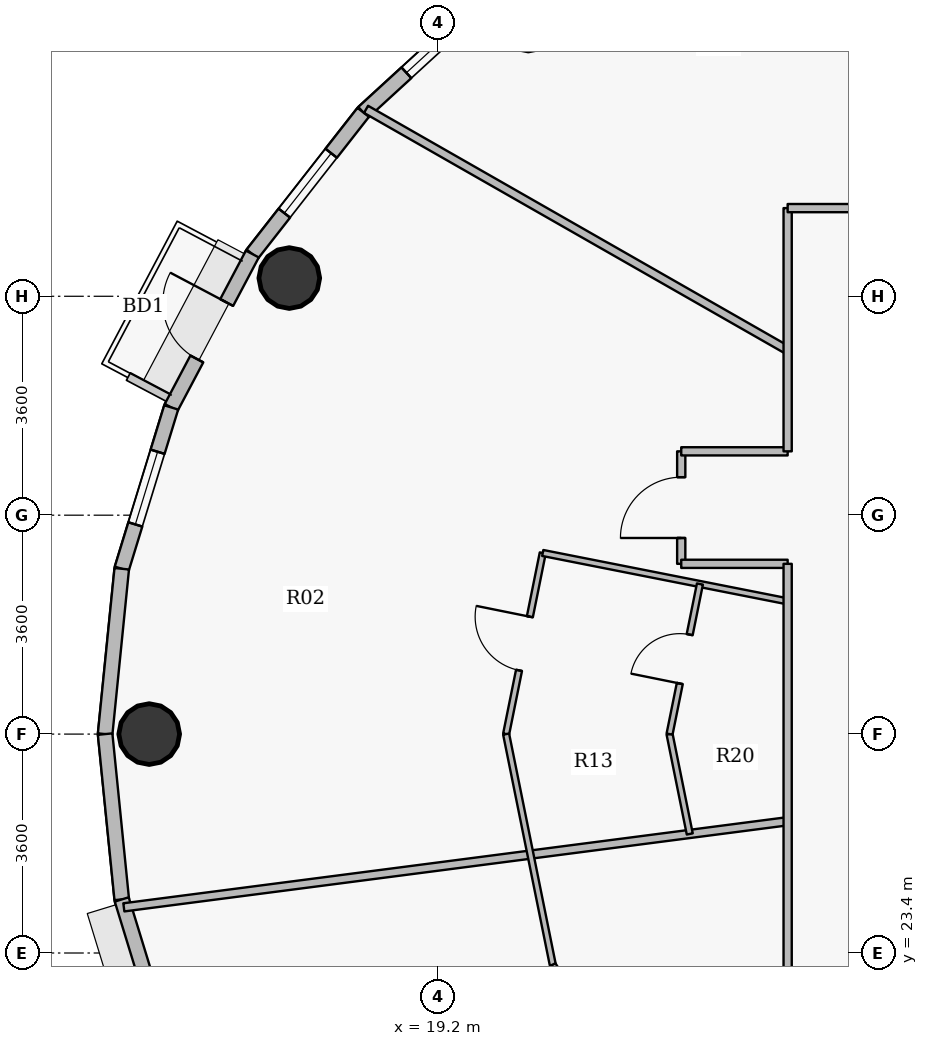
"""IFC4 building model, lengths in metres.
Left out: names, types, materials, properties, quantities, classifications, styles, units other than length and angle.
Written with IfcOpenShell. Run it as: python <this file> out.ifc"""

import sys

from ifc_helpers import new_model, si_unit, direction, frame, frame_2d, origin, origin_2d, place, context, subcontext, project, spatial, rectangle, hollow_circle, extrude, source, transform, mapped, element, fill, save


model = new_model("IFC4")
c1 = context("Model", 3, precision=1e-05, world=origin(), true_north=direction((0.0, 1.0)))
c2 = subcontext(c1, "Body", "Model", "MODEL_VIEW")
j1 = project(units=[si_unit("LENGTHUNIT", "METRE"), si_unit("PLANEANGLEUNIT", "RADIAN")], contexts=[c1])
p1 = place(None, origin())
s1 = spatial("IfcSite", under=j1, at=p1, CompositionType="ELEMENT")
p2 = place(p1, origin())
s2 = spatial("IfcBuilding", under=s1, at=p2, CompositionType="ELEMENT")
p3 = place(p2, frame((0.0, 0.0, 303.0)))
s3 = spatial("IfcBuildingStorey", under=s2, at=p3, CompositionType="ELEMENT", Elevation=303.0)
for number, where, z_axis, x_axis in (
    (1, (16.754, 34.5, 0.0), (0.0, 0.0, 1.0), (1.0, 0.0, 0.0)),
    (2, (14.45, 27.0, 0.0), (0.0, 0.0, 1.0), (1.0, 0.0, 0.0)),
):
    element("IfcColumn", number, at=place(p3, frame(where, z_axis=z_axis, x_axis=x_axis)), inside=s3, PredefinedType="COLUMN", context=c2, shape_type="SweptSolid", body=[
        extrude(hollow_circle(Radius=0.5, WallThickness=0.032, at=origin_2d()), origin(), (0.0, 0.0, 1.0), 3.75),
    ])
p4 = place(p3, frame((17.97, 37.225, 0.0), z_axis=(0.0, 0.0, 1.0), x_axis=(0.737068506972, 0.675818034703, 0.0)))
e3 = element("IfcWall", 3, at=p4, inside=s3, PredefinedType="SOLIDWALL", context=c2, shape_type="SweptSolid", body=[
    extrude(rectangle(XDim=3.077, YDim=0.24, at=frame_2d((1.539, 0.0))), origin(), (0.0, 0.0, 1.0), 3.5),
])
p5 = place(p4, frame((0.963, 0.0, 0.9)))
e4 = element("IfcOpeningElement", 4, at=p5, cuts=e3, PredefinedType="OPENING", context=c2, shape_type="SweptSolid", body=[
    extrude(rectangle(XDim=1.25, YDim=1.65, at=origin_2d()), frame((0.625, 0.13, 0.825), z_axis=(0.0, -1.0, 0.0), x_axis=(1.0, 0.0, 0.0)), (0.0, 0.0, 1.0), 0.26),
])
p6 = place(p3, frame((16.146, 34.895, 0.0), z_axis=(0.0, 0.0, 1.0), x_axis=(0.616337186556, 0.787482363275, 0.0)))
e5 = element("IfcWall", 5, at=p6, inside=s3, PredefinedType="SOLIDWALL", context=c2, shape_type="SweptSolid", body=[
    extrude(rectangle(XDim=2.958, YDim=0.24, at=frame_2d((1.479, 0.0))), origin(), (0.0, 0.0, 1.0), 3.5),
])
p7 = place(p6, frame((0.854, 0.0, 0.9)))
e6 = element("IfcOpeningElement", 6, at=p7, cuts=e5, PredefinedType="OPENING", context=c2, shape_type="SweptSolid", body=[
    extrude(rectangle(XDim=1.25, YDim=1.65, at=origin_2d()), frame((0.625, 0.13, 0.825), z_axis=(0.0, -1.0, 0.0), x_axis=(1.0, 0.0, 0.0)), (0.0, 0.0, 1.0), 0.26),
])
p8 = place(p3, frame((14.812, 32.372, 0.0), z_axis=(0.0, 0.0, 1.0), x_axis=(0.467628269026, 0.883925224218, 0.0)))
e7 = element("IfcWall", 7, at=p8, inside=s3, PredefinedType="SOLIDWALL", context=c2, shape_type="SweptSolid", body=[
    extrude(rectangle(XDim=2.854, YDim=0.24, at=frame_2d((1.427, 0.0))), origin(), (0.0, 0.0, 1.0), 3.5),
])
p9 = place(p8, frame((0.902, 0.0, 0.0)))
e8 = element("IfcOpeningElement", 8, at=p9, cuts=e7, PredefinedType="OPENING", context=c2, shape_type="SweptSolid", body=[
    extrude(rectangle(XDim=1.05, YDim=2.15, at=origin_2d()), frame((0.525, 0.13, 1.075), z_axis=(0.0, -1.0, 0.0), x_axis=(1.0, 0.0, 0.0)), (0.0, 0.0, 1.0), 0.26),
])
p10 = place(p3, frame((13.998, 29.719, 0.0), z_axis=(0.0, 0.0, 1.0), x_axis=(0.2931213403, 0.956075248012, 0.0)))
e9 = element("IfcWall", 9, at=p10, inside=s3, PredefinedType="SOLIDWALL", context=c2, shape_type="SweptSolid", body=[
    extrude(rectangle(XDim=2.775, YDim=0.24, at=frame_2d((1.388, 0.0))), origin(), (0.0, 0.0, 1.0), 3.5),
])
p11 = place(p10, frame((0.763, 0.0, 0.9)))
e10 = element("IfcOpeningElement", 10, at=p11, cuts=e9, PredefinedType="OPENING", context=c2, shape_type="SweptSolid", body=[
    extrude(rectangle(XDim=1.25, YDim=1.65, at=origin_2d()), frame((0.625, 0.13, 0.825), z_axis=(0.0, -1.0, 0.0), x_axis=(1.0, 0.0, 0.0)), (0.0, 0.0, 1.0), 0.26),
])
for number, where, z_axis, x_axis in (
    (11, (13.725, 27.0, 0.0), (0.0, 0.0, 1.0), (0.1, 0.995, 0.0)),
    (12, (13.998, 24.281, 0.0), (0.0, 0.0, 1.0), (-0.1, 0.995, 0.0)),
):
    element("IfcWall", number, at=place(p3, frame(where, z_axis=z_axis, x_axis=x_axis)), inside=s3, PredefinedType="SOLIDWALL", context=c2, shape_type="SweptSolid", body=[
        extrude(rectangle(XDim=2.733, YDim=0.24, at=frame_2d((1.366, 0.0))), origin(), (0.0, 0.0, 1.0), 3.5),
    ])
p12 = place(p3, frame((14.812, 21.628, 0.0), z_axis=(0.0, 0.0, 1.0), x_axis=(-0.2931213403, 0.956075248012, 0.0)))
e13 = element("IfcWall", 13, at=p12, inside=s3, PredefinedType="SOLIDWALL", context=c2, shape_type="SweptSolid", body=[
    extrude(rectangle(XDim=2.775, YDim=0.24, at=frame_2d((1.388, 0.0))), origin(), (0.0, 0.0, 1.0), 3.5),
])
p13 = place(p3, frame((14.033, 24.151, 0.0), z_axis=(0.0, 0.0, 1.0), x_axis=(0.99169266035, 0.128629963101, 0.0)))
e14 = element("IfcWall", 14, at=p13, inside=s3, PredefinedType="PARTITIONING", context=c2, shape_type="SweptSolid", body=[
    extrude(rectangle(XDim=11.009, YDim=0.135, at=frame_2d((5.504, 0.0))), origin(), (0.0, 0.0, 1.0), 2.985),
])
p14 = place(p3, frame((18.016, 37.274, 0.0), z_axis=(0.0, 0.0, 1.0), x_axis=(0.868277005727, -0.496079672357, 0.0)))
e15 = element("IfcWall", 15, at=p14, inside=s3, PredefinedType="PARTITIONING", context=c2, shape_type="SweptSolid", body=[
    extrude(rectangle(XDim=7.985, YDim=0.135, at=frame_2d((3.993, 0.0))), origin(), (0.0, 0.0, 1.0), 2.985),
])
p15 = place(p3, frame((20.32, 27.0, 0.0), z_axis=(0.0, 0.0, 1.0), x_axis=(0.198201469781, 0.980161301713, 0.0)))
e16 = element("IfcWall", 16, at=p15, inside=s3, PredefinedType="PARTITIONING", context=c2, shape_type="SweptSolid", body=[
    extrude(rectangle(XDim=3.039, YDim=0.1, at=frame_2d((1.52, 0.0))), origin(), (0.0, 0.0, 1.0), 3.035),
])
p16 = place(p15, frame((1.069, 0.0, 0.0)))
e17 = element("IfcOpeningElement", 17, at=p16, cuts=e16, PredefinedType="OPENING", context=c2, shape_type="SweptSolid", body=[
    extrude(rectangle(XDim=0.9, YDim=2.1, at=origin_2d()), frame((0.45, 0.06, 1.05), z_axis=(0.0, -1.0, 0.0), x_axis=(1.0, 0.0, 0.0)), (0.0, 0.0, 1.0), 0.12),
])
p17 = place(p3, frame((20.32, 27.0, 0.0), z_axis=(0.0, 0.0, 1.0), x_axis=(0.198226068862, -0.980156327135, 0.0)))
e18 = element("IfcWall", 18, at=p17, inside=s3, PredefinedType="PARTITIONING", context=c2, shape_type="SweptSolid", body=[
    extrude(rectangle(XDim=3.871, YDim=0.1, at=frame_2d((1.936, 0.0))), origin(), (0.0, 0.0, 1.0), 3.035),
])
p18 = place(p3, frame((20.922, 29.979, 0.0), z_axis=(0.0, 0.0, 1.0), x_axis=(0.981042206934, -0.19379419035, 0.0)))
e19 = element("IfcWall", 19, at=p18, inside=s3, PredefinedType="PARTITIONING", context=c2, shape_type="SweptSolid", body=[
    extrude(rectangle(XDim=4.106, YDim=0.1, at=frame_2d((2.053, 0.0))), origin(), (0.0, 0.0, 1.0), 3.5),
])
p19 = place(p3, frame((21.087, 23.206, 0.0), z_axis=(0.0, 0.0, 1.0), x_axis=(0.545435886628, -0.838152547916, 0.0)))
e20 = element("IfcWall", 20, at=p19, inside=s3, PredefinedType="PARTITIONING", context=c2, shape_type="SweptSolid", body=[
    extrude(rectangle(XDim=4.083, YDim=0.1, at=frame_2d((2.042, 0.0))), origin(), (0.0, 0.0, 1.0), 3.035),
])
p20 = place(p3, frame((23.008, 27.0, 0.0), z_axis=(0.0, 0.0, 1.0), x_axis=(0.198189512146, -0.980163719628, 0.0)))
e21 = element("IfcWall", 21, at=p20, inside=s3, PredefinedType="PARTITIONING", context=c2, shape_type="SweptSolid", body=[
    extrude(rectangle(XDim=1.675, YDim=0.1, at=frame_2d((0.838, 0.0))), origin(), (0.0, 0.0, 1.0), 3.035),
])
p21 = place(p3, frame((23.008, 27.0, 0.0), z_axis=(0.0, 0.0, 1.0), x_axis=(0.19818541272, 0.980164548525, 0.0)))
e22 = element("IfcWall", 22, at=p21, inside=s3, PredefinedType="PARTITIONING", context=c2, shape_type="SweptSolid", body=[
    extrude(rectangle(XDim=2.518, YDim=0.1, at=frame_2d((1.259, 0.0))), origin(), (0.0, 0.0, 1.0), 3.035),
])
p22 = place(p21, frame((0.849, 0.0, 0.0)))
e23 = element("IfcOpeningElement", 23, at=p22, cuts=e22, PredefinedType="OPENING", context=c2, shape_type="SweptSolid", body=[
    extrude(rectangle(XDim=0.82, YDim=2.1, at=origin_2d()), frame((0.41, 0.06, 1.05), z_axis=(0.0, -1.0, 0.0), x_axis=(1.0, 0.0, 0.0)), (0.0, 0.0, 1.0), 0.12),
])
p23 = place(p3, frame((23.2, 29.8, 0.0), z_axis=(0.0, 0.0, 1.0), x_axis=(0.0, 1.0, 0.0)))
e24 = element("IfcWall", 24, at=p23, inside=s3, PredefinedType="PARTITIONING", context=c2, shape_type="SweptSolid", body=[
    extrude(rectangle(XDim=1.85, YDim=0.135, at=frame_2d((0.925, 0.0))), origin(), (0.0, 0.0, 1.0), 3.5),
])
p24 = place(p23, frame((0.425, 0.0, 0.0)))
e25 = element("IfcOpeningElement", 25, at=p24, cuts=e24, PredefinedType="OPENING", context=c2, shape_type="SweptSolid", body=[
    extrude(rectangle(XDim=1.0, YDim=2.15, at=origin_2d()), frame((0.5, 0.078, 1.075), z_axis=(0.0, -1.0, 0.0), x_axis=(1.0, 0.0, 0.0)), (0.0, 0.0, 1.0), 0.155),
])
p25 = place(p3, frame((23.2, 29.8, 0.0), z_axis=(0.0, 0.0, 1.0), x_axis=(1.0, 0.0, 0.0)))
e26 = element("IfcWall", 26, at=p25, inside=s3, PredefinedType="PARTITIONING", context=c2, shape_type="SweptSolid", body=[
    extrude(rectangle(XDim=1.75, YDim=0.135, at=frame_2d((0.875, 0.0))), origin(), (0.0, 0.0, 1.0), 3.5),
])
p26 = place(p3, frame((23.2, 31.65, 0.0), z_axis=(0.0, 0.0, 1.0), x_axis=(1.0, 0.0, 0.0)))
e27 = element("IfcWall", 27, at=p26, inside=s3, PredefinedType="PARTITIONING", context=c2, shape_type="SweptSolid", body=[
    extrude(rectangle(XDim=1.75, YDim=0.135, at=frame_2d((0.875, 0.0))), origin(), (0.0, 0.0, 1.0), 3.035),
])
p27 = place(p3, frame((24.95, 18.35, 0.0), z_axis=(0.0, 0.0, 1.0), x_axis=(0.0, 1.0, 0.0)))
e28 = element("IfcWall", 28, at=p27, inside=s3, PredefinedType="PARTITIONING", context=c2, shape_type="SweptSolid", body=[
    extrude(rectangle(XDim=11.45, YDim=0.135, at=frame_2d((5.725, 0.0))), origin(), (0.0, 0.0, 1.0), 3.035),
])
p28 = place(p27, frame((3.128, 0.0, 0.0)))
e29 = element("IfcOpeningElement", 29, at=p28, cuts=e28, PredefinedType="OPENING", context=c2, shape_type="SweptSolid", body=[
    extrude(rectangle(XDim=1.0, YDim=2.15, at=origin_2d()), frame((0.5, 0.078, 1.075), z_axis=(0.0, -1.0, 0.0), x_axis=(1.0, 0.0, 0.0)), (0.0, 0.0, 1.0), 0.155),
])
p29 = place(p3, frame((24.95, 31.65, 0.0), z_axis=(0.0, 0.0, 1.0), x_axis=(0.0, 1.0, 0.0)))
e30 = element("IfcWall", 30, at=p29, inside=s3, PredefinedType="PARTITIONING", context=c2, shape_type="SweptSolid", body=[
    extrude(rectangle(XDim=4.0, YDim=0.135, at=frame_2d((2.0, 0.0))), origin(), (0.0, 0.0, 1.0), 3.035),
])
p30 = place(p3, frame((24.95, 35.65, 0.0), z_axis=(0.0, 0.0, 1.0), x_axis=(1.0, 0.0, 0.0)))
e31 = element("IfcWall", 31, at=p30, inside=s3, PredefinedType="PARTITIONING", context=c2, shape_type="SweptSolid", body=[
    extrude(rectangle(XDim=10.1, YDim=0.135, at=frame_2d((5.05, 0.0))), origin(), (0.0, 0.0, 1.0), 3.035),
])
p31 = place(p30, frame((1.192, 0.0, 0.0)))
e32 = element("IfcOpeningElement", 32, at=p31, cuts=e31, PredefinedType="OPENING", context=c2, shape_type="SweptSolid", body=[
    extrude(rectangle(XDim=1.0, YDim=2.15, at=origin_2d()), frame((0.5, 0.078, 1.075), z_axis=(0.0, -1.0, 0.0), x_axis=(1.0, 0.0, 0.0)), (0.0, 0.0, 1.0), 0.155),
])
m1 = source(origin(), c2, "Body", "SweptSolid", [
    extrude(rectangle(XDim=1.25, YDim=1.65, at=origin_2d()), frame((0.625, 0.03, 0.825), z_axis=(0.0, -1.0, 0.0), x_axis=(1.0, 0.0, 0.0)), (0.0, 0.0, 1.0), 0.06),
])
p32 = place(p5, origin())
e33 = element("IfcWindow", 33, at=p32, inside=s3, PartitioningType="SINGLE_PANEL", PredefinedType="WINDOW", context=c2, shape_type="MappedRepresentation", body=[
    mapped(m1, transform((0.0, 0.0, 0.0), x_axis=(1.0, 0.0, 0.0), y_axis=(0.0, 1.0, 0.0), z_axis=(0.0, 0.0, 1.0), scale=1.0)),
])
fill(e4, e33)
p33 = place(p7, origin())
e34 = element("IfcWindow", 34, at=p33, inside=s3, PartitioningType="SINGLE_PANEL", PredefinedType="WINDOW", context=c2, shape_type="MappedRepresentation", body=[
    mapped(m1, transform((0.0, 0.0, 0.0), x_axis=(1.0, 0.0, 0.0), y_axis=(0.0, 1.0, 0.0), z_axis=(0.0, 0.0, 1.0), scale=1.0)),
])
fill(e6, e34)
m2 = source(origin(), c2, "Body", "SweptSolid", [
    extrude(rectangle(XDim=1.05, YDim=2.15, at=origin_2d()), frame((0.525, 0.025, 1.075), z_axis=(0.0, -1.0, 0.0), x_axis=(1.0, 0.0, 0.0)), (0.0, 0.0, 1.0), 0.05),
])
p34 = place(p9, origin())
e35 = element("IfcDoor", 35, at=p34, inside=s3, OperationType="SINGLE_SWING_RIGHT", PredefinedType="DOOR", context=c2, shape_type="MappedRepresentation", body=[
    mapped(m2, transform((0.0, 0.0, 0.0), x_axis=(1.0, 0.0, 0.0), y_axis=(0.0, 1.0, 0.0), z_axis=(0.0, 0.0, 1.0), scale=1.0)),
])
fill(e8, e35)
p35 = place(p11, origin())
e36 = element("IfcWindow", 36, at=p35, inside=s3, PartitioningType="SINGLE_PANEL", PredefinedType="WINDOW", context=c2, shape_type="MappedRepresentation", body=[
    mapped(m1, transform((0.0, 0.0, 0.0), x_axis=(1.0, 0.0, 0.0), y_axis=(0.0, 1.0, 0.0), z_axis=(0.0, 0.0, 1.0), scale=1.0)),
])
fill(e10, e36)
m3 = source(origin(), c2, "Body", "SweptSolid", [
    extrude(rectangle(XDim=1.0, YDim=2.15, at=origin_2d()), frame((0.5, 0.025, 1.075), z_axis=(0.0, -1.0, 0.0), x_axis=(1.0, 0.0, 0.0)), (0.0, 0.0, 1.0), 0.05),
])
p36 = place(p24, origin())
e37 = element("IfcDoor", 37, at=p36, inside=s3, OperationType="SINGLE_SWING_LEFT", PredefinedType="DOOR", context=c2, shape_type="MappedRepresentation", body=[
    mapped(m3, transform((0.0, 0.0, 0.0), x_axis=(1.0, 0.0, 0.0), y_axis=(0.0, 1.0, 0.0), z_axis=(0.0, 0.0, 1.0), scale=1.0)),
])
fill(e25, e37)
m4 = source(origin(), c2, "Body", "SweptSolid", [
    extrude(rectangle(XDim=0.9, YDim=2.1, at=origin_2d()), frame((0.45, 0.025, 1.05), z_axis=(0.0, -1.0, 0.0), x_axis=(1.0, 0.0, 0.0)), (0.0, 0.0, 1.0), 0.05),
])
p37 = place(p16, origin())
e38 = element("IfcDoor", 38, at=p37, inside=s3, OperationType="SINGLE_SWING_RIGHT", PredefinedType="DOOR", context=c2, shape_type="MappedRepresentation", body=[
    mapped(m4, transform((0.0, 0.0, 0.0), x_axis=(1.0, 0.0, 0.0), y_axis=(0.0, 1.0, 0.0), z_axis=(0.0, 0.0, 1.0), scale=1.0)),
])
fill(e17, e38)
m5 = source(origin(), c2, "Body", "SweptSolid", [
    extrude(rectangle(XDim=0.82, YDim=2.1, at=origin_2d()), frame((0.41, 0.025, 1.05), z_axis=(0.0, -1.0, 0.0), x_axis=(1.0, 0.0, 0.0)), (0.0, 0.0, 1.0), 0.05),
])
p38 = place(p22, origin())
e39 = element("IfcDoor", 39, at=p38, inside=s3, OperationType="SINGLE_SWING_LEFT", PredefinedType="DOOR", context=c2, shape_type="MappedRepresentation", body=[
    mapped(m5, transform((0.0, 0.0, 0.0), x_axis=(1.0, 0.0, 0.0), y_axis=(0.0, 1.0, 0.0), z_axis=(0.0, 0.0, 1.0), scale=1.0)),
])
fill(e23, e39)
save(model, sys.argv[1])
